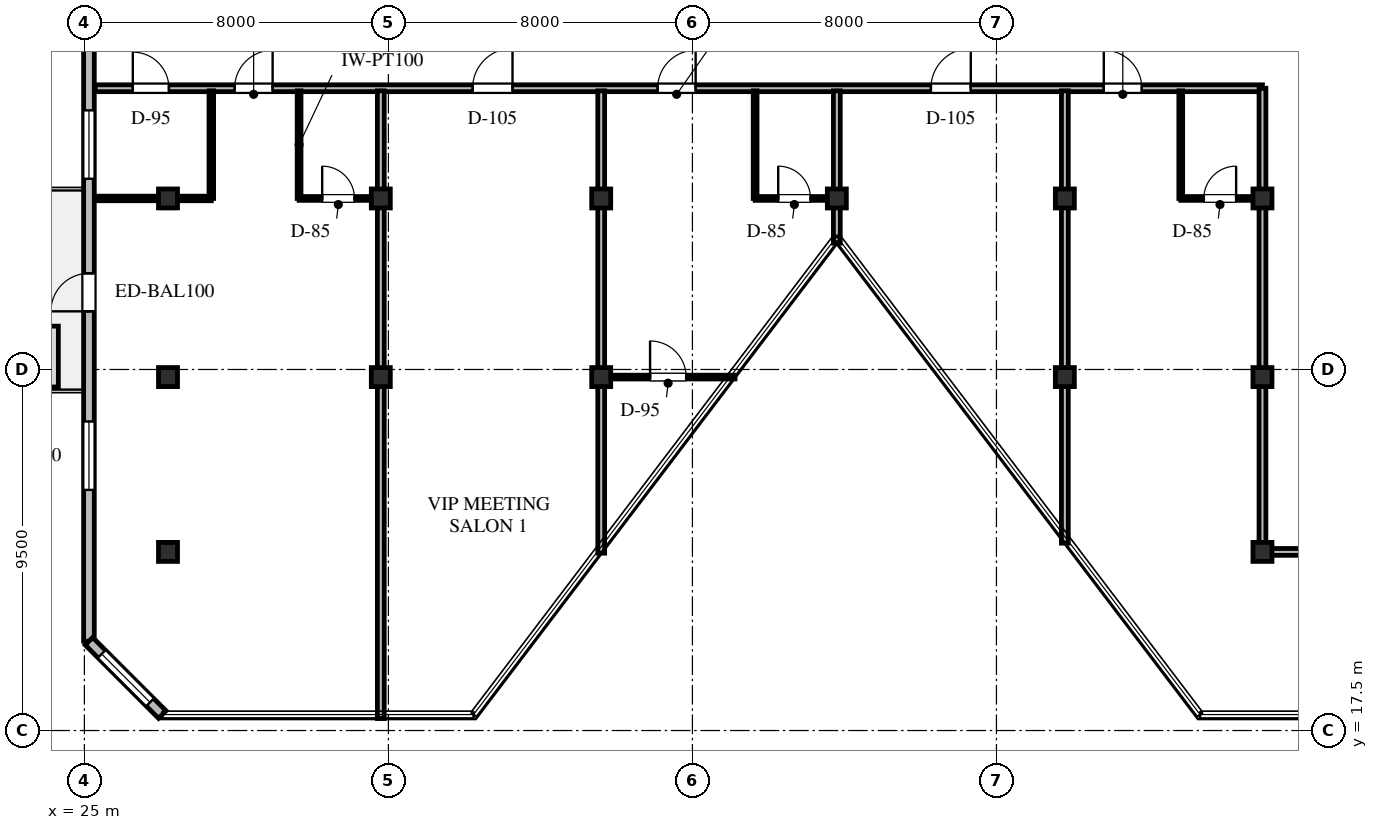
"""IFC4 building model, lengths in metres.
Left out: names, types, materials, properties, quantities, classifications, styles, units other than length and angle.
Written with IfcOpenShell. Run it as: python <this file> out.ifc"""

import sys

from ifc_helpers import new_model, si_unit, direction, frame, frame_2d, origin, origin_2d, place, context, subcontext, project, spatial, rectangle, hollow_rectangle, extrude, element, fill, save


model = new_model("IFC4")
c1 = context("Model", 3, precision=1e-05, world=origin(), true_north=direction((0.0, 1.0)))
c2 = subcontext(c1, "Body", "Model", "MODEL_VIEW")
j1 = project(units=[si_unit("LENGTHUNIT", "METRE"), si_unit("PLANEANGLEUNIT", "RADIAN")], contexts=[c1])
p1 = place(None, origin())
s1 = spatial("IfcSite", under=j1, at=p1, CompositionType="ELEMENT")
p2 = place(p1, origin())
s2 = spatial("IfcBuilding", under=s1, at=p2, CompositionType="ELEMENT")
p3 = place(p2, frame((0.0, 0.0, 249.0)))
s3 = spatial("IfcBuildingStorey", under=s2, at=p3, CompositionType="ELEMENT", Elevation=249.0)
for number, where, z_axis, x_axis in (
    (1, (44.8, 31.5, 0.0), (0.0, 0.0, 1.0), (1.0, 0.0, 0.0)),
    (2, (50.8, 31.5, 0.0), (0.0, 0.0, 1.0), (1.0, 0.0, 0.0)),
    (3, (56.0, 31.5, 0.0), (0.0, 0.0, 1.0), (1.0, 0.0, 0.0)),
    (4, (38.6, 31.5, 0.0), (0.0, 0.0, 1.0), (1.0, 0.0, 0.0)),
    (5, (32.8, 31.5, 0.0), (0.0, 0.0, 1.0), (1.0, 0.0, 0.0)),
    (6, (27.2, 31.5, 0.0), (0.0, 0.0, 1.0), (1.0, 0.0, 0.0)),
    (7, (38.6, 26.8, 0.0), (0.0, 0.0, 1.0), (1.0, 0.0, 0.0)),
    (8, (50.8, 26.8, 0.0), (0.0, 0.0, 1.0), (1.0, 0.0, 0.0)),
    (9, (56.0, 26.8, 0.0), (0.0, 0.0, 1.0), (1.0, 0.0, 0.0)),
    (10, (56.0, 22.2, 0.0), (0.0, 0.0, 1.0), (1.0, 0.0, 0.0)),
    (11, (27.2, 22.2, 0.0), (0.0, 0.0, 1.0), (1.0, 0.0, 0.0)),
    (12, (27.2, 26.8, 0.0), (0.0, 0.0, 1.0), (1.0, 0.0, 0.0)),
    (13, (32.8, 26.8, 0.0), (0.0, 0.0, 1.0), (1.0, 0.0, 0.0)),
):
    element("IfcColumn", number, at=place(p3, frame(where, z_axis=z_axis, x_axis=x_axis)), inside=s3, PredefinedType="COLUMN", context=c2, shape_type="SweptSolid", body=[
        extrude(hollow_rectangle(XDim=0.5, YDim=0.5, WallThickness=0.02, at=origin_2d()), origin(), (0.0, 0.0, 1.0), 3.6),
    ])
p4 = place(p3, frame((25.12, 19.85, 0.0), z_axis=(0.0, 0.0, 1.0), x_axis=(0.0, 1.0, 0.0)))
e14 = element("IfcWall", 14, at=p4, inside=s3, PredefinedType="STANDARD", context=c2, shape_type="SweptSolid", body=[
    extrude(rectangle(XDim=17.95, YDim=0.28, at=frame_2d((8.975, 0.0))), origin(), (0.0, 0.0, 1.0), 3.36),
])
p5 = place(p4, frame((8.68, 0.0, 0.0)))
e15 = element("IfcOpeningElement", 15, at=p5, cuts=e14, PredefinedType="OPENING", context=c2, shape_type="SweptSolid", body=[
    extrude(rectangle(XDim=1.0, YDim=2.15, at=frame_2d((0.5, 1.075))), frame((0.0, 0.15, 0.0), z_axis=(0.0, -1.0, 0.0), x_axis=(1.0, 0.0, 0.0)), (0.0, 0.0, 1.0), 0.3),
])
p6 = place(p4, frame((3.982, 0.0, 0.65)))
e16 = element("IfcOpeningElement", 16, at=p6, cuts=e14, PredefinedType="OPENING", context=c2, shape_type="SweptSolid", body=[
    extrude(rectangle(XDim=1.8, YDim=2.1, at=frame_2d((0.9, 1.05))), frame((0.0, 0.15, 0.0), z_axis=(0.0, -1.0, 0.0), x_axis=(1.0, 0.0, 0.0)), (0.0, 0.0, 1.0), 0.3),
])
p7 = place(p4, frame((12.168, 0.0, 0.65)))
e17 = element("IfcOpeningElement", 17, at=p7, cuts=e14, PredefinedType="OPENING", context=c2, shape_type="SweptSolid", body=[
    extrude(rectangle(XDim=1.8, YDim=2.1, at=frame_2d((0.9, 1.05))), frame((0.0, 0.15, 0.0), z_axis=(0.0, -1.0, 0.0), x_axis=(1.0, 0.0, 0.0)), (0.0, 0.0, 1.0), 0.3),
])
p8 = place(p3, frame((27.05, 17.92, 0.0), z_axis=(0.0, 0.0, 1.0), x_axis=(-0.707106781187, 0.707106781187, 0.0)))
e18 = element("IfcWall", 18, at=p8, inside=s3, PredefinedType="STANDARD", context=c2, shape_type="SweptSolid", body=[
    extrude(rectangle(XDim=2.729, YDim=0.28, at=frame_2d((1.365, 0.0))), origin(), (0.0, 0.0, 1.0), 3.36),
])
p9 = place(p8, frame((0.455, 0.0, 0.65)))
e19 = element("IfcOpeningElement", 19, at=p9, cuts=e18, PredefinedType="OPENING", context=c2, shape_type="SweptSolid", body=[
    extrude(rectangle(XDim=1.8, YDim=2.1, at=frame_2d((0.9, 1.05))), frame((0.0, 0.15, 0.0), z_axis=(0.0, -1.0, 0.0), x_axis=(1.0, 0.0, 0.0)), (0.0, 0.0, 1.0), 0.3),
])
p10 = place(p3, frame((25.285, 34.4, 0.0), z_axis=(0.0, 0.0, 1.0), x_axis=(1.0, 0.0, 0.0)))
e20 = element("IfcWall", 20, at=p10, inside=s3, PredefinedType="STANDARD", context=c2, shape_type="SweptSolid", body=[
    extrude(rectangle(XDim=30.715, YDim=0.18, at=frame_2d((15.357, 0.0))), origin(), (0.0, 0.0, 1.0), 2.664),
])
p11 = place(p10, frame((0.989, 0.0, 0.0)))
e21 = element("IfcOpeningElement", 21, at=p11, cuts=e20, PredefinedType="OPENING", context=c2, shape_type="SweptSolid", body=[
    extrude(rectangle(XDim=0.95, YDim=2.15, at=frame_2d((0.475, 1.075))), frame((0.0, 0.1, 0.0), z_axis=(0.0, -1.0, 0.0), x_axis=(1.0, 0.0, 0.0)), (0.0, 0.0, 1.0), 0.2),
])
p12 = place(p10, frame((3.669, 0.0, 0.0)))
e22 = element("IfcOpeningElement", 22, at=p12, cuts=e20, PredefinedType="OPENING", context=c2, shape_type="SweptSolid", body=[
    extrude(rectangle(XDim=1.0, YDim=2.15, at=frame_2d((0.5, 1.075))), frame((0.0, 0.1, 0.0), z_axis=(0.0, -1.0, 0.0), x_axis=(1.0, 0.0, 0.0)), (0.0, 0.0, 1.0), 0.2),
])
p13 = place(p10, frame((9.931, 0.0, 0.0)))
e23 = element("IfcOpeningElement", 23, at=p13, cuts=e20, PredefinedType="OPENING", context=c2, shape_type="SweptSolid", body=[
    extrude(rectangle(XDim=1.05, YDim=2.2, at=frame_2d((0.525, 1.1))), frame((0.0, 0.1, 0.0), z_axis=(0.0, -1.0, 0.0), x_axis=(1.0, 0.0, 0.0)), (0.0, 0.0, 1.0), 0.2),
])
p14 = place(p10, frame((14.8, 0.0, 0.0)))
e24 = element("IfcOpeningElement", 24, at=p14, cuts=e20, PredefinedType="OPENING", context=c2, shape_type="SweptSolid", body=[
    extrude(rectangle(XDim=1.0, YDim=2.15, at=frame_2d((0.5, 1.075))), frame((0.0, 0.1, 0.0), z_axis=(0.0, -1.0, 0.0), x_axis=(1.0, 0.0, 0.0)), (0.0, 0.0, 1.0), 0.2),
])
p15 = place(p10, frame((21.99, 0.0, 0.0)))
e25 = element("IfcOpeningElement", 25, at=p15, cuts=e20, PredefinedType="OPENING", context=c2, shape_type="SweptSolid", body=[
    extrude(rectangle(XDim=1.05, YDim=2.2, at=frame_2d((0.525, 1.1))), frame((0.0, 0.1, 0.0), z_axis=(0.0, -1.0, 0.0), x_axis=(1.0, 0.0, 0.0)), (0.0, 0.0, 1.0), 0.2),
])
p16 = place(p10, frame((26.54, 0.0, 0.0)))
e26 = element("IfcOpeningElement", 26, at=p16, cuts=e20, PredefinedType="OPENING", context=c2, shape_type="SweptSolid", body=[
    extrude(rectangle(XDim=1.0, YDim=2.15, at=frame_2d((0.5, 1.075))), frame((0.0, 0.1, 0.0), z_axis=(0.0, -1.0, 0.0), x_axis=(1.0, 0.0, 0.0)), (0.0, 0.0, 1.0), 0.2),
])
p17 = place(p3, frame((56.0, 22.2, 0.0), z_axis=(0.0, 0.0, 1.0), x_axis=(0.0, 1.0, 0.0)))
e27 = element("IfcWall", 27, at=p17, inside=s3, PredefinedType="STANDARD", context=c2, shape_type="SweptSolid", body=[
    extrude(rectangle(XDim=12.2, YDim=0.18, at=frame_2d((6.1, 0.0))), origin(), (0.0, 0.0, 1.0), 2.664),
])
p18 = place(p3, frame((56.0, 22.2, 0.0), z_axis=(0.0, 0.0, 1.0), x_axis=(1.0, 0.0, 0.0)))
e28 = element("IfcWall", 28, at=p18, inside=s3, PredefinedType="STANDARD", context=c2, shape_type="SweptSolid", body=[
    extrude(rectangle(XDim=2.25, YDim=0.18, at=frame_2d((1.125, 0.0))), origin(), (0.0, 0.0, 1.0), 2.664),
])
p19 = place(p3, frame((28.34, 31.5, 0.0), z_axis=(0.0, 0.0, 1.0), x_axis=(0.0, 1.0, 0.0)))
e29 = element("IfcWall", 29, at=p19, inside=s3, PredefinedType="PARTITIONING", context=c2, shape_type="SweptSolid", body=[
    extrude(rectangle(XDim=2.832, YDim=0.12, at=frame_2d((1.416, 0.0))), origin(), (0.0, 0.0, 1.0), 2.664),
])
p20 = place(p3, frame((25.285, 31.5, 0.0), z_axis=(0.0, 0.0, 1.0), x_axis=(1.0, 0.0, 0.0)))
e30 = element("IfcWall", 30, at=p20, inside=s3, PredefinedType="PARTITIONING", context=c2, shape_type="SweptSolid", body=[
    extrude(rectangle(XDim=3.055, YDim=0.12, at=frame_2d((1.528, 0.0))), origin(), (0.0, 0.0, 1.0), 2.664),
])
p21 = place(p3, frame((30.65, 31.5, 0.0), z_axis=(0.0, 0.0, 1.0), x_axis=(0.0, 1.0, 0.0)))
e31 = element("IfcWall", 31, at=p21, inside=s3, PredefinedType="PARTITIONING", context=c2, shape_type="SweptSolid", body=[
    extrude(rectangle(XDim=2.832, YDim=0.1, at=frame_2d((1.416, 0.0))), origin(), (0.0, 0.0, 1.0), 2.664),
])
p22 = place(p3, frame((30.65, 31.5, 0.0), z_axis=(0.0, 0.0, 1.0), x_axis=(1.0, 0.0, 0.0)))
e32 = element("IfcWall", 32, at=p22, inside=s3, PredefinedType="PARTITIONING", context=c2, shape_type="SweptSolid", body=[
    extrude(rectangle(XDim=2.082, YDim=0.1, at=frame_2d((1.041, 0.0))), origin(), (0.0, 0.0, 1.0), 2.664),
])
p23 = place(p22, frame((0.607, 0.0, 0.0)))
e33 = element("IfcOpeningElement", 33, at=p23, cuts=e32, PredefinedType="OPENING", context=c2, shape_type="SweptSolid", body=[
    extrude(rectangle(XDim=0.85, YDim=2.1, at=frame_2d((0.425, 1.05))), frame((0.0, 0.06, 0.0), z_axis=(0.0, -1.0, 0.0), x_axis=(1.0, 0.0, 0.0)), (0.0, 0.0, 1.0), 0.12),
])
p24 = place(p3, frame((32.8, 17.815, 0.0), z_axis=(0.0, 0.0, 1.0), x_axis=(0.0, 1.0, 0.0)))
e34 = element("IfcWall", 34, at=p24, inside=s3, PredefinedType="STANDARD", context=c2, shape_type="SweptSolid", body=[
    extrude(rectangle(XDim=16.517, YDim=0.18, at=frame_2d((8.259, 0.0))), origin(), (0.0, 0.0, 1.0), 2.664),
])
p25 = place(p3, frame((38.6, 22.167, 0.0), z_axis=(0.0, 0.0, 1.0), x_axis=(0.0, 1.0, 0.0)))
e35 = element("IfcWall", 35, at=p25, inside=s3, PredefinedType="STANDARD", context=c2, shape_type="SweptSolid", body=[
    extrude(rectangle(XDim=12.165, YDim=0.18, at=frame_2d((6.083, 0.0))), origin(), (0.0, 0.0, 1.0), 2.664),
])
p26 = place(p3, frame((38.668, 26.8, 0.0), z_axis=(0.0, 0.0, 1.0), x_axis=(1.0, 0.0, 0.0)))
e36 = element("IfcWall", 36, at=p26, inside=s3, PredefinedType="PARTITIONING", context=c2, shape_type="SweptSolid", body=[
    extrude(rectangle(XDim=3.453, YDim=0.1, at=frame_2d((1.727, 0.0))), origin(), (0.0, 0.0, 1.0), 2.664),
])
p27 = place(p26, frame((1.218, 0.0, 0.0)))
e37 = element("IfcOpeningElement", 37, at=p27, cuts=e36, PredefinedType="OPENING", context=c2, shape_type="SweptSolid", body=[
    extrude(rectangle(XDim=0.95, YDim=2.15, at=frame_2d((0.475, 1.075))), frame((0.0, 0.06, 0.0), z_axis=(0.0, -1.0, 0.0), x_axis=(1.0, 0.0, 0.0)), (0.0, 0.0, 1.0), 0.12),
])
p28 = place(p3, frame((42.65, 31.5, 0.0), z_axis=(0.0, 0.0, 1.0), x_axis=(0.0, 1.0, 0.0)))
e38 = element("IfcWall", 38, at=p28, inside=s3, PredefinedType="PARTITIONING", context=c2, shape_type="SweptSolid", body=[
    extrude(rectangle(XDim=2.832, YDim=0.1, at=frame_2d((1.416, 0.0))), origin(), (0.0, 0.0, 1.0), 2.664),
])
p29 = place(p3, frame((42.65, 31.5, 0.0), z_axis=(0.0, 0.0, 1.0), x_axis=(1.0, 0.0, 0.0)))
e39 = element("IfcWall", 39, at=p29, inside=s3, PredefinedType="PARTITIONING", context=c2, shape_type="SweptSolid", body=[
    extrude(rectangle(XDim=2.082, YDim=0.1, at=frame_2d((1.041, 0.0))), origin(), (0.0, 0.0, 1.0), 2.664),
])
p30 = place(p29, frame((0.607, 0.0, 0.0)))
e40 = element("IfcOpeningElement", 40, at=p30, cuts=e39, PredefinedType="OPENING", context=c2, shape_type="SweptSolid", body=[
    extrude(rectangle(XDim=0.85, YDim=2.1, at=frame_2d((0.425, 1.05))), frame((0.0, 0.06, 0.0), z_axis=(0.0, -1.0, 0.0), x_axis=(1.0, 0.0, 0.0)), (0.0, 0.0, 1.0), 0.12),
])
p31 = place(p3, frame((44.8, 30.325, 0.0), z_axis=(0.0, 0.0, 1.0), x_axis=(0.0, 1.0, 0.0)))
e41 = element("IfcWall", 41, at=p31, inside=s3, PredefinedType="STANDARD", context=c2, shape_type="SweptSolid", body=[
    extrude(rectangle(XDim=4.007, YDim=0.18, at=frame_2d((2.004, 0.0))), origin(), (0.0, 0.0, 1.0), 2.664),
])
p32 = place(p3, frame((50.8, 22.43, 0.0), z_axis=(0.0, 0.0, 1.0), x_axis=(0.0, 1.0, 0.0)))
e42 = element("IfcWall", 42, at=p32, inside=s3, PredefinedType="STANDARD", context=c2, shape_type="SweptSolid", body=[
    extrude(rectangle(XDim=11.902, YDim=0.18, at=frame_2d((5.951, 0.0))), origin(), (0.0, 0.0, 1.0), 2.664),
])
p33 = place(p3, frame((53.85, 31.5, 0.0), z_axis=(0.0, 0.0, 1.0), x_axis=(0.0, 1.0, 0.0)))
e43 = element("IfcWall", 43, at=p33, inside=s3, PredefinedType="PARTITIONING", context=c2, shape_type="SweptSolid", body=[
    extrude(rectangle(XDim=2.832, YDim=0.1, at=frame_2d((1.416, 0.0))), origin(), (0.0, 0.0, 1.0), 2.664),
])
p34 = place(p3, frame((53.85, 31.5, 0.0), z_axis=(0.0, 0.0, 1.0), x_axis=(1.0, 0.0, 0.0)))
e44 = element("IfcWall", 44, at=p34, inside=s3, PredefinedType="PARTITIONING", context=c2, shape_type="SweptSolid", body=[
    extrude(rectangle(XDim=2.082, YDim=0.1, at=frame_2d((1.041, 0.0))), origin(), (0.0, 0.0, 1.0), 2.664),
])
p35 = place(p34, frame((0.607, 0.0, 0.0)))
e45 = element("IfcOpeningElement", 45, at=p35, cuts=e44, PredefinedType="OPENING", context=c2, shape_type="SweptSolid", body=[
    extrude(rectangle(XDim=0.85, YDim=2.1, at=frame_2d((0.425, 1.05))), frame((0.0, 0.06, 0.0), z_axis=(0.0, -1.0, 0.0), x_axis=(1.0, 0.0, 0.0)), (0.0, 0.0, 1.0), 0.12),
])
p36 = place(p5, origin())
e46 = element("IfcDoor", 46, at=p36, inside=s3, OperationType="SINGLE_SWING_LEFT", PredefinedType="DOOR", context=c2, shape_type="SweptSolid", body=[
    extrude(rectangle(XDim=1.0, YDim=2.15, at=frame_2d((0.5, 1.075))), frame((0.0, 0.025, 0.0), z_axis=(0.0, -1.0, 0.0), x_axis=(1.0, 0.0, 0.0)), (0.0, 0.0, 1.0), 0.05),
])
fill(e15, e46)
p37 = place(p6, origin())
e47 = element("IfcWindow", 47, at=p37, inside=s3, PartitioningType="SINGLE_PANEL", PredefinedType="WINDOW", context=c2, shape_type="SweptSolid", body=[
    extrude(rectangle(XDim=1.8, YDim=2.1, at=frame_2d((0.9, 1.05))), frame((0.0, 0.03, 0.0), z_axis=(0.0, -1.0, 0.0), x_axis=(1.0, 0.0, 0.0)), (0.0, 0.0, 1.0), 0.06),
])
fill(e16, e47)
p38 = place(p7, origin())
e48 = element("IfcWindow", 48, at=p38, inside=s3, PartitioningType="SINGLE_PANEL", PredefinedType="WINDOW", context=c2, shape_type="SweptSolid", body=[
    extrude(rectangle(XDim=1.8, YDim=2.1, at=frame_2d((0.9, 1.05))), frame((0.0, 0.03, 0.0), z_axis=(0.0, -1.0, 0.0), x_axis=(1.0, 0.0, 0.0)), (0.0, 0.0, 1.0), 0.06),
])
fill(e17, e48)
p39 = place(p9, origin())
e49 = element("IfcWindow", 49, at=p39, inside=s3, PartitioningType="SINGLE_PANEL", PredefinedType="WINDOW", context=c2, shape_type="SweptSolid", body=[
    extrude(rectangle(XDim=1.8, YDim=2.1, at=frame_2d((0.9, 1.05))), frame((0.0, 0.03, 0.0), z_axis=(0.0, -1.0, 0.0), x_axis=(1.0, 0.0, 0.0)), (0.0, 0.0, 1.0), 0.06),
])
fill(e19, e49)
p40 = place(p11, origin())
e50 = element("IfcDoor", 50, at=p40, inside=s3, OperationType="SINGLE_SWING_LEFT", PredefinedType="DOOR", context=c2, shape_type="SweptSolid", body=[
    extrude(rectangle(XDim=0.95, YDim=2.15, at=frame_2d((0.475, 1.075))), frame((0.0, 0.025, 0.0), z_axis=(0.0, -1.0, 0.0), x_axis=(1.0, 0.0, 0.0)), (0.0, 0.0, 1.0), 0.05),
])
fill(e21, e50)
p41 = place(p12, origin())
e51 = element("IfcDoor", 51, at=p41, inside=s3, OperationType="SINGLE_SWING_RIGHT", PredefinedType="DOOR", context=c2, shape_type="SweptSolid", body=[
    extrude(rectangle(XDim=1.0, YDim=2.15, at=frame_2d((0.5, 1.075))), frame((0.0, 0.025, 0.0), z_axis=(0.0, -1.0, 0.0), x_axis=(1.0, 0.0, 0.0)), (0.0, 0.0, 1.0), 0.05),
])
fill(e22, e51)
p42 = place(p23, origin())
e52 = element("IfcDoor", 52, at=p42, inside=s3, OperationType="SINGLE_SWING_LEFT", PredefinedType="DOOR", context=c2, shape_type="SweptSolid", body=[
    extrude(rectangle(XDim=0.85, YDim=2.1, at=frame_2d((0.425, 1.05))), frame((0.0, 0.025, 0.0), z_axis=(0.0, -1.0, 0.0), x_axis=(1.0, 0.0, 0.0)), (0.0, 0.0, 1.0), 0.05),
])
fill(e33, e52)
p43 = place(p13, origin())
e53 = element("IfcDoor", 53, at=p43, inside=s3, OperationType="SINGLE_SWING_RIGHT", PredefinedType="DOOR", context=c2, shape_type="SweptSolid", body=[
    extrude(rectangle(XDim=1.05, YDim=2.2, at=frame_2d((0.525, 1.1))), frame((0.0, 0.025, 0.0), z_axis=(0.0, -1.0, 0.0), x_axis=(1.0, 0.0, 0.0)), (0.0, 0.0, 1.0), 0.05),
])
fill(e23, e53)
p44 = place(p27, origin())
e54 = element("IfcDoor", 54, at=p44, inside=s3, OperationType="SINGLE_SWING_LEFT", PredefinedType="DOOR", context=c2, shape_type="SweptSolid", body=[
    extrude(rectangle(XDim=0.95, YDim=2.15, at=frame_2d((0.475, 1.075))), frame((0.0, 0.025, 0.0), z_axis=(0.0, -1.0, 0.0), x_axis=(1.0, 0.0, 0.0)), (0.0, 0.0, 1.0), 0.05),
])
fill(e37, e54)
p45 = place(p14, origin())
e55 = element("IfcDoor", 55, at=p45, inside=s3, OperationType="SINGLE_SWING_RIGHT", PredefinedType="DOOR", context=c2, shape_type="SweptSolid", body=[
    extrude(rectangle(XDim=1.0, YDim=2.15, at=frame_2d((0.5, 1.075))), frame((0.0, 0.025, 0.0), z_axis=(0.0, -1.0, 0.0), x_axis=(1.0, 0.0, 0.0)), (0.0, 0.0, 1.0), 0.05),
])
fill(e24, e55)
p46 = place(p30, origin())
e56 = element("IfcDoor", 56, at=p46, inside=s3, OperationType="SINGLE_SWING_LEFT", PredefinedType="DOOR", context=c2, shape_type="SweptSolid", body=[
    extrude(rectangle(XDim=0.85, YDim=2.1, at=frame_2d((0.425, 1.05))), frame((0.0, 0.025, 0.0), z_axis=(0.0, -1.0, 0.0), x_axis=(1.0, 0.0, 0.0)), (0.0, 0.0, 1.0), 0.05),
])
fill(e40, e56)
p47 = place(p15, origin())
e57 = element("IfcDoor", 57, at=p47, inside=s3, OperationType="SINGLE_SWING_RIGHT", PredefinedType="DOOR", context=c2, shape_type="SweptSolid", body=[
    extrude(rectangle(XDim=1.05, YDim=2.2, at=frame_2d((0.525, 1.1))), frame((0.0, 0.025, 0.0), z_axis=(0.0, -1.0, 0.0), x_axis=(1.0, 0.0, 0.0)), (0.0, 0.0, 1.0), 0.05),
])
fill(e25, e57)
p48 = place(p16, origin())
e58 = element("IfcDoor", 58, at=p48, inside=s3, OperationType="SINGLE_SWING_LEFT", PredefinedType="DOOR", context=c2, shape_type="SweptSolid", body=[
    extrude(rectangle(XDim=1.0, YDim=2.15, at=frame_2d((0.5, 1.075))), frame((0.0, 0.025, 0.0), z_axis=(0.0, -1.0, 0.0), x_axis=(1.0, 0.0, 0.0)), (0.0, 0.0, 1.0), 0.05),
])
fill(e26, e58)
p49 = place(p35, origin())
e59 = element("IfcDoor", 59, at=p49, inside=s3, OperationType="SINGLE_SWING_RIGHT", PredefinedType="DOOR", context=c2, shape_type="SweptSolid", body=[
    extrude(rectangle(XDim=0.85, YDim=2.1, at=frame_2d((0.425, 1.05))), frame((0.0, 0.025, 0.0), z_axis=(0.0, -1.0, 0.0), x_axis=(1.0, 0.0, 0.0)), (0.0, 0.0, 1.0), 0.05),
])
fill(e45, e59)
save(model, sys.argv[1])
